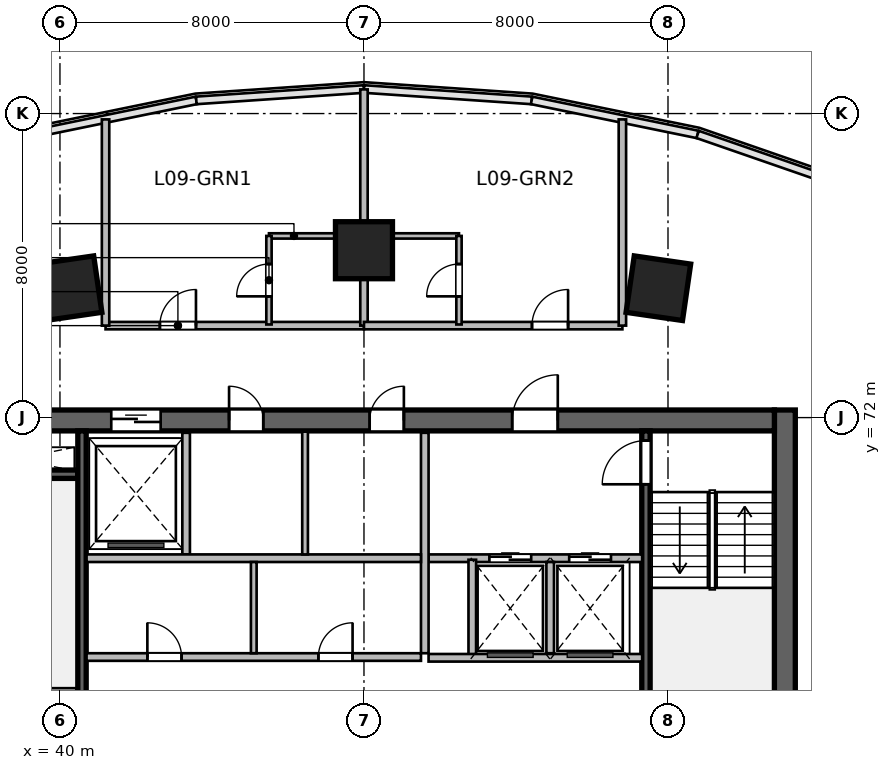
"""IFC4 building model, lengths in metres.
Left out: names, types, materials, properties, quantities, classifications, styles, units other than length and angle.
Written with IfcOpenShell. Run it as: python <this file> out.ifc"""

import sys

from ifc_helpers import new_model, si_unit, direction, frame, frame_2d, origin, origin_2d, place, context, subcontext, project, spatial, rectangle, extrude, source, transform, mapped, element, fill, save


model = new_model("IFC4")
c1 = context("Model", 3, precision=1e-05, world=origin(), true_north=direction((0.0, 1.0)))
c2 = subcontext(c1, "Body", "Model", "MODEL_VIEW")
j1 = project(units=[si_unit("LENGTHUNIT", "METRE"), si_unit("PLANEANGLEUNIT", "RADIAN")], contexts=[c1])
p1 = place(None, origin())
s1 = spatial("IfcSite", under=j1, at=p1, CompositionType="ELEMENT")
p2 = place(p1, origin())
s2 = spatial("IfcBuilding", under=s1, at=p2, CompositionType="ELEMENT")
p3 = place(p2, frame((0.0, 0.0, 46.2)))
s3 = spatial("IfcBuildingStorey", under=s2, at=p3, CompositionType="ELEMENT", Elevation=46.2)
m1 = source(origin(), c2, "Body", "SweptSolid", [
    extrude(rectangle(XDim=12.0, YDim=0.55, at=frame_2d((6.0, 0.0))), origin(), (0.0, 0.0, 1.0), 3.6),
])
p4 = place(p3, frame((59.075, 60.2, 0.0), z_axis=(0.0, 0.0, 1.0), x_axis=(0.0, 1.0, 0.0)))
e1 = element("IfcWall", 1, at=p4, inside=s3, PredefinedType="SHEAR", context=c2, shape_type="MappedRepresentation", body=[
    mapped(m1, transform((0.0, 0.0, 0.0), scale=1.0)),
])
m2 = source(origin(), c2, "Body", "SweptSolid", [
    extrude(rectangle(XDim=21.6, YDim=0.55, at=frame_2d((10.8, 0.0))), origin(), (0.0, 0.0, 1.0), 3.6),
])
p5 = place(p3, frame((37.2, 71.925, 0.0), z_axis=(0.0, 0.0, 1.0), x_axis=(1.0, 0.0, 0.0)))
e2 = element("IfcWall", 2, at=p5, inside=s3, PredefinedType="SHEAR", context=c2, shape_type="MappedRepresentation", body=[
    mapped(m2, transform((0.0, 0.0, 0.0), scale=1.0)),
])
p6 = place(p5, frame((1.2, 0.0, 0.0)))
e3 = element("IfcOpeningElement", 3, at=p6, cuts=e2, PredefinedType="OPENING", context=c2, shape_type="SweptSolid", body=[
    extrude(rectangle(XDim=0.9, YDim=2.1, at=frame_2d((0.45, 1.05))), frame((0.0, 0.285, 0.0), z_axis=(0.0, -1.0, 0.0), x_axis=(1.0, 0.0, 0.0)), (0.0, 0.0, 1.0), 0.57),
])
p7 = place(p5, frame((14.7, 0.0, 0.0)))
e4 = element("IfcOpeningElement", 4, at=p7, cuts=e2, PredefinedType="OPENING", context=c2, shape_type="SweptSolid", body=[
    extrude(rectangle(XDim=1.2, YDim=2.15, at=frame_2d((0.6, 1.075))), frame((0.0, 0.285, 0.0), z_axis=(0.0, -1.0, 0.0), x_axis=(1.0, 0.0, 0.0)), (0.0, 0.0, 1.0), 0.57),
])
p8 = place(p5, frame((4.15, 0.0, 0.0)))
e5 = element("IfcOpeningElement", 5, at=p8, cuts=e2, PredefinedType="OPENING", context=c2, shape_type="SweptSolid", body=[
    extrude(rectangle(XDim=1.3, YDim=2.15, at=frame_2d((0.65, 1.075))), frame((0.0, 0.285, 0.0), z_axis=(0.0, -1.0, 0.0), x_axis=(1.0, 0.0, 0.0)), (0.0, 0.0, 1.0), 0.57),
])
p9 = place(p5, frame((7.25, 0.0, 0.0)))
e6 = element("IfcOpeningElement", 6, at=p9, cuts=e2, PredefinedType="OPENING", context=c2, shape_type="SweptSolid", body=[
    extrude(rectangle(XDim=0.9, YDim=2.1, at=frame_2d((0.45, 1.05))), frame((0.0, 0.285, 0.0), z_axis=(0.0, -1.0, 0.0), x_axis=(1.0, 0.0, 0.0)), (0.0, 0.0, 1.0), 0.57),
])
p10 = place(p5, frame((10.95, 0.0, 0.0)))
e7 = element("IfcOpeningElement", 7, at=p10, cuts=e2, PredefinedType="OPENING", context=c2, shape_type="SweptSolid", body=[
    extrude(rectangle(XDim=0.9, YDim=2.1, at=frame_2d((0.45, 1.05))), frame((0.0, 0.285, 0.0), z_axis=(0.0, -1.0, 0.0), x_axis=(1.0, 0.0, 0.0)), (0.0, 0.0, 1.0), 0.57),
])
m3 = source(origin(), c2, "Body", "SweptSolid", [
    extrude(rectangle(XDim=3.27, YDim=0.22, at=frame_2d((1.635, 0.0))), origin(), (0.0, 0.0, 1.0), 3.6),
])
p11 = place(p3, frame((37.2, 70.51, 0.0), z_axis=(0.0, 0.0, 1.0), x_axis=(1.0, 0.0, 0.0)))
e8 = element("IfcWall", 8, at=p11, inside=s3, PredefinedType="SHEAR", context=c2, shape_type="MappedRepresentation", body=[
    mapped(m3, transform((0.0, 0.0, 0.0), scale=1.0)),
])
m4 = source(origin(), c2, "Body", "SweptSolid", [
    extrude(rectangle(XDim=10.9, YDim=0.22, at=frame_2d((5.45, 0.0))), origin(), (0.0, 0.0, 1.0), 3.6),
])
p12 = place(p3, frame((40.58, 60.75, 0.0), z_axis=(0.0, 0.0, 1.0), x_axis=(0.0, 1.0, 0.0)))
e9 = element("IfcWall", 9, at=p12, inside=s3, PredefinedType="SHEAR", context=c2, shape_type="MappedRepresentation", body=[
    mapped(m4, transform((0.0, 0.0, 0.0), scale=1.0)),
])
p13 = place(p3, frame((55.42, 60.75, 0.0), z_axis=(0.0, 0.0, 1.0), x_axis=(0.0, 1.0, 0.0)))
e10 = element("IfcWall", 10, at=p13, inside=s3, PredefinedType="SHEAR", context=c2, shape_type="MappedRepresentation", body=[
    mapped(m4, transform((0.0, 0.0, 0.0), scale=1.0)),
])
p14 = place(p13, frame((9.495, 0.0, 0.0)))
e11 = element("IfcOpeningElement", 11, at=p14, cuts=e10, PredefinedType="OPENING", context=c2, shape_type="SweptSolid", body=[
    extrude(rectangle(XDim=1.15, YDim=2.15, at=frame_2d((0.575, 1.075))), frame((0.0, 0.12, 0.0), z_axis=(0.0, -1.0, 0.0), x_axis=(1.0, 0.0, 0.0)), (0.0, 0.0, 1.0), 0.24),
])
m5 = source(origin(), c2, "Body", "SweptSolid", [
    extrude(rectangle(XDim=1.5, YDim=1.5, at=origin_2d()), origin(), (0.0, 0.0, 1.0), 3.6),
])
for number, where, z_axis, x_axis in (
    (12, (40.253, 75.404, 0.0), (0.0, 0.0, 1.0), (-0.143, 0.99, 0.0)),
    (13, (48.0, 76.404, 0.0), (0.0, 0.0, 1.0), (0.0, 1.0, 0.0)),
    (14, (55.747, 75.404, 0.0), (0.0, 0.0, 1.0), (0.143, 0.99, 0.0)),
):
    element("IfcColumn", number, at=place(p3, frame(where, z_axis=z_axis, x_axis=x_axis)), inside=s3, PredefinedType="COLUMN", context=c2, shape_type="MappedRepresentation", body=[
        mapped(m5, transform((0.0, 0.0, 0.0), scale=1.0)),
    ])
m6 = source(origin(), c2, "Body", "SweptSolid", [
    extrude(rectangle(XDim=5.62, YDim=0.2, at=frame_2d((2.81, 0.0))), origin(), (0.0, 0.0, 1.0), 3.36),
])
p15 = place(p3, frame((49.7, 68.3, 0.0), z_axis=(0.0, 0.0, 1.0), x_axis=(1.0, 0.0, 0.0)))
e15 = element("IfcWall", 15, at=p15, inside=s3, PredefinedType="SOLIDWALL", context=c2, shape_type="MappedRepresentation", body=[
    mapped(m6, transform((0.0, 0.0, 0.0), scale=1.0)),
])
p16 = place(p15, frame((1.6, 0.0, 0.0)))
e16 = element("IfcOpeningElement", 16, at=p16, cuts=e15, PredefinedType="OPENING", context=c2, shape_type="SweptSolid", body=[
    extrude(rectangle(XDim=1.1, YDim=2.15, at=frame_2d((0.55, 1.075))), frame((0.0, 0.11, 0.0), z_axis=(0.0, -1.0, 0.0), x_axis=(1.0, 0.0, 0.0)), (0.0, 0.0, 1.0), 0.22),
])
p17 = place(p15, frame((3.7, 0.0, 0.0)))
e17 = element("IfcOpeningElement", 17, at=p17, cuts=e15, PredefinedType="OPENING", context=c2, shape_type="SweptSolid", body=[
    extrude(rectangle(XDim=1.1, YDim=2.15, at=frame_2d((0.55, 1.075))), frame((0.0, 0.11, 0.0), z_axis=(0.0, -1.0, 0.0), x_axis=(1.0, 0.0, 0.0)), (0.0, 0.0, 1.0), 0.22),
])
m7 = source(origin(), c2, "Body", "SweptSolid", [
    extrude(rectangle(XDim=5.8, YDim=0.2, at=frame_2d((2.9, 0.0))), origin(), (0.0, 0.0, 1.0), 3.36),
])
p18 = place(p3, frame((49.6, 65.8, 0.0), z_axis=(0.0, 0.0, 1.0), x_axis=(0.0, 1.0, 0.0)))
e18 = element("IfcWall", 18, at=p18, inside=s3, PredefinedType="SOLIDWALL", context=c2, shape_type="MappedRepresentation", body=[
    mapped(m7, transform((0.0, 0.0, 0.0), scale=1.0)),
])
m8 = source(origin(), c2, "Body", "SweptSolid", [
    extrude(rectangle(XDim=2.58, YDim=0.2, at=frame_2d((1.29, 0.0))), origin(), (0.0, 0.0, 1.0), 3.36),
])
p19 = place(p3, frame((50.85, 65.68, 0.0), z_axis=(0.0, 0.0, 1.0), x_axis=(0.0, 1.0, 0.0)))
e19 = element("IfcWall", 19, at=p19, inside=s3, PredefinedType="SOLIDWALL", context=c2, shape_type="MappedRepresentation", body=[
    mapped(m8, transform((0.0, 0.0, 0.0), scale=1.0)),
])
m9 = source(origin(), c2, "Body", "SweptSolid", [
    extrude(rectangle(XDim=2.4, YDim=0.2, at=frame_2d((1.2, 0.0))), origin(), (0.0, 0.0, 1.0), 3.36),
])
p20 = place(p3, frame((52.9, 65.8, 0.0), z_axis=(0.0, 0.0, 1.0), x_axis=(0.0, 1.0, 0.0)))
e20 = element("IfcWall", 20, at=p20, inside=s3, PredefinedType="SOLIDWALL", context=c2, shape_type="MappedRepresentation", body=[
    mapped(m9, transform((0.0, 0.0, 0.0), scale=1.0)),
])
p21 = place(p3, frame((49.7, 65.68, 0.0), z_axis=(0.0, 0.0, 1.0), x_axis=(1.0, 0.0, 0.0)))
e21 = element("IfcWall", 21, at=p21, inside=s3, PredefinedType="SOLIDWALL", context=c2, shape_type="MappedRepresentation", body=[
    mapped(m6, transform((0.0, 0.0, 0.0), scale=1.0)),
])
m10 = source(origin(), c2, "Body", "SweptSolid", [
    extrude(rectangle(XDim=3.2, YDim=0.2, at=frame_2d((1.6, 0.0))), origin(), (0.0, 0.0, 1.0), 3.36),
])
p22 = place(p3, frame((43.32, 68.4, 0.0), z_axis=(0.0, 0.0, 1.0), x_axis=(0.0, 1.0, 0.0)))
e22 = element("IfcWall", 22, at=p22, inside=s3, PredefinedType="SOLIDWALL", context=c2, shape_type="MappedRepresentation", body=[
    mapped(m10, transform((0.0, 0.0, 0.0), scale=1.0)),
])
m11 = source(origin(), c2, "Body", "SweptSolid", [
    extrude(rectangle(XDim=8.8, YDim=0.2, at=frame_2d((4.4, 0.0))), origin(), (0.0, 0.0, 1.0), 3.36),
])
p23 = place(p3, frame((40.7, 68.3, 0.0), z_axis=(0.0, 0.0, 1.0), x_axis=(1.0, 0.0, 0.0)))
e23 = element("IfcWall", 23, at=p23, inside=s3, PredefinedType="SOLIDWALL", context=c2, shape_type="MappedRepresentation", body=[
    mapped(m11, transform((0.0, 0.0, 0.0), scale=1.0)),
])
m12 = source(origin(), c2, "Body", "SweptSolid", [
    extrude(rectangle(XDim=3.23, YDim=0.15, at=frame_2d((1.615, 0.0))), origin(), (0.0, 0.0, 1.0), 3.36),
])
p24 = place(p3, frame((46.45, 68.4, 0.0), z_axis=(0.0, 0.0, 1.0), x_axis=(0.0, 1.0, 0.0)))
e24 = element("IfcWall", 24, at=p24, inside=s3, PredefinedType="PARTITIONING", context=c2, shape_type="MappedRepresentation", body=[
    mapped(m12, transform((0.0, 0.0, 0.0), scale=1.0)),
])
p25 = place(p3, frame((40.7, 65.7, 0.0), z_axis=(0.0, 0.0, 1.0), x_axis=(1.0, 0.0, 0.0)))
e25 = element("IfcWall", 25, at=p25, inside=s3, PredefinedType="SOLIDWALL", context=c2, shape_type="MappedRepresentation", body=[
    mapped(m11, transform((0.0, 0.0, 0.0), scale=1.0)),
])
p26 = place(p25, frame((1.6, 0.0, 0.0)))
e26 = element("IfcOpeningElement", 26, at=p26, cuts=e25, PredefinedType="OPENING", context=c2, shape_type="SweptSolid", body=[
    extrude(rectangle(XDim=0.9, YDim=2.1, at=frame_2d((0.45, 1.05))), frame((0.0, 0.11, 0.0), z_axis=(0.0, -1.0, 0.0), x_axis=(1.0, 0.0, 0.0)), (0.0, 0.0, 1.0), 0.22),
])
p27 = place(p25, frame((6.1, 0.0, 0.0)))
e27 = element("IfcOpeningElement", 27, at=p27, cuts=e25, PredefinedType="OPENING", context=c2, shape_type="SweptSolid", body=[
    extrude(rectangle(XDim=0.9, YDim=2.1, at=frame_2d((0.45, 1.05))), frame((0.0, 0.11, 0.0), z_axis=(0.0, -1.0, 0.0), x_axis=(1.0, 0.0, 0.0)), (0.0, 0.0, 1.0), 0.22),
])
m13 = source(origin(), c2, "Body", "SweptSolid", [
    extrude(rectangle(XDim=2.4, YDim=0.15, at=frame_2d((1.2, 0.0))), origin(), (0.0, 0.0, 1.0), 3.36),
])
p28 = place(p3, frame((45.1, 65.8, 0.0), z_axis=(0.0, 0.0, 1.0), x_axis=(0.0, 1.0, 0.0)))
e28 = element("IfcWall", 28, at=p28, inside=s3, PredefinedType="PARTITIONING", context=c2, shape_type="MappedRepresentation", body=[
    mapped(m13, transform((0.0, 0.0, 0.0), scale=1.0)),
])
m14 = source(origin(), c2, "Body", "SweptSolid", [
    extrude(rectangle(XDim=6.8, YDim=0.195, at=frame_2d((3.4, 0.0))), origin(), (0.0, 0.0, 1.0), 3.36),
])
p29 = place(p3, frame((41.2, 74.42, 0.0), z_axis=(0.0, 0.0, 1.0), x_axis=(1.0, 0.0, 0.0)))
e29 = element("IfcWall", 29, at=p29, inside=s3, PredefinedType="PARTITIONING", context=c2, shape_type="MappedRepresentation", body=[
    mapped(m14, transform((0.0, 0.0, 0.0), scale=1.0)),
])
p30 = place(p29, frame((1.429, 0.0, 0.0)))
e30 = element("IfcOpeningElement", 30, at=p30, cuts=e29, PredefinedType="OPENING", context=c2, shape_type="SweptSolid", body=[
    extrude(rectangle(XDim=0.95, YDim=2.15, at=frame_2d((0.475, 1.075))), frame((0.0, 0.107, 0.0), z_axis=(0.0, -1.0, 0.0), x_axis=(1.0, 0.0, 0.0)), (0.0, 0.0, 1.0), 0.215),
])
m15 = source(origin(), c2, "Body", "SweptSolid", [
    extrude(rectangle(XDim=6.216, YDim=0.195, at=frame_2d((3.108, 0.0))), origin(), (0.0, 0.0, 1.0), 2.644),
])
p31 = place(p3, frame((48.0, 74.42, 0.0), z_axis=(0.0, 0.0, 1.0), x_axis=(0.0, 1.0, 0.0)))
e31 = element("IfcWall", 31, at=p31, inside=s3, PredefinedType="PARTITIONING", context=c2, shape_type="MappedRepresentation", body=[
    mapped(m15, transform((0.0, 0.0, 0.0), scale=1.0)),
])
m16 = source(origin(), c2, "Body", "SweptSolid", [
    extrude(rectangle(XDim=5.426, YDim=0.195, at=frame_2d((2.713, 0.0))), origin(), (0.0, 0.0, 1.0), 3.36),
])
p32 = place(p3, frame((41.2, 74.42, 0.0), z_axis=(0.0, 0.0, 1.0), x_axis=(0.0, 1.0, 0.0)))
e32 = element("IfcWall", 32, at=p32, inside=s3, PredefinedType="PARTITIONING", context=c2, shape_type="MappedRepresentation", body=[
    mapped(m16, transform((0.0, 0.0, 0.0), scale=1.0)),
])
m17 = source(origin(), c2, "Body", "SweptSolid", [
    extrude(rectangle(XDim=2.35, YDim=0.14, at=frame_2d((1.175, 0.0))), origin(), (0.0, 0.0, 1.0), 3.36),
])
p33 = place(p3, frame((45.5, 76.78, 0.0), z_axis=(0.0, 0.0, 1.0), x_axis=(1.0, 0.0, 0.0)))
e33 = element("IfcWall", 33, at=p33, inside=s3, PredefinedType="PARTITIONING", context=c2, shape_type="MappedRepresentation", body=[
    mapped(m17, transform((0.0, 0.0, 0.0), scale=1.0)),
])
m18 = source(origin(), c2, "Body", "SweptSolid", [
    extrude(rectangle(XDim=2.33, YDim=0.14, at=frame_2d((1.165, 0.0))), origin(), (0.0, 0.0, 1.0), 3.36),
])
p34 = place(p3, frame((45.5, 74.45, 0.0), z_axis=(0.0, 0.0, 1.0), x_axis=(0.0, 1.0, 0.0)))
e34 = element("IfcWall", 34, at=p34, inside=s3, PredefinedType="PARTITIONING", context=c2, shape_type="MappedRepresentation", body=[
    mapped(m18, transform((0.0, 0.0, 0.0), scale=1.0)),
])
p35 = place(p34, frame((0.74, 0.0, 0.0)))
e35 = element("IfcOpeningElement", 35, at=p35, cuts=e34, PredefinedType="OPENING", context=c2, shape_type="SweptSolid", body=[
    extrude(rectangle(XDim=0.85, YDim=2.05, at=frame_2d((0.425, 1.025))), frame((0.0, 0.08, 0.0), z_axis=(0.0, -1.0, 0.0), x_axis=(1.0, 0.0, 0.0)), (0.0, 0.0, 1.0), 0.16),
])
p36 = place(p3, frame((48.0, 74.42, 0.0), z_axis=(0.0, 0.0, 1.0), x_axis=(1.0, 0.0, 0.0)))
e36 = element("IfcWall", 36, at=p36, inside=s3, PredefinedType="PARTITIONING", context=c2, shape_type="MappedRepresentation", body=[
    mapped(m14, transform((0.0, 0.0, 0.0), scale=1.0)),
])
p37 = place(p36, frame((4.421, 0.0, 0.0)))
e37 = element("IfcOpeningElement", 37, at=p37, cuts=e36, PredefinedType="OPENING", context=c2, shape_type="SweptSolid", body=[
    extrude(rectangle(XDim=0.95, YDim=2.15, at=frame_2d((0.475, 1.075))), frame((0.0, 0.107, 0.0), z_axis=(0.0, -1.0, 0.0), x_axis=(1.0, 0.0, 0.0)), (0.0, 0.0, 1.0), 0.215),
])
p38 = place(p3, frame((54.8, 74.42, 0.0), z_axis=(0.0, 0.0, 1.0), x_axis=(0.0, 1.0, 0.0)))
e38 = element("IfcWall", 38, at=p38, inside=s3, PredefinedType="PARTITIONING", context=c2, shape_type="MappedRepresentation", body=[
    mapped(m16, transform((0.0, 0.0, 0.0), scale=1.0)),
])
p39 = place(p3, frame((48.15, 76.78, 0.0), z_axis=(0.0, 0.0, 1.0), x_axis=(1.0, 0.0, 0.0)))
e39 = element("IfcWall", 39, at=p39, inside=s3, PredefinedType="PARTITIONING", context=c2, shape_type="MappedRepresentation", body=[
    mapped(m17, transform((0.0, 0.0, 0.0), scale=1.0)),
])
p40 = place(p3, frame((50.5, 74.45, 0.0), z_axis=(0.0, 0.0, 1.0), x_axis=(0.0, 1.0, 0.0)))
e40 = element("IfcWall", 40, at=p40, inside=s3, PredefinedType="PARTITIONING", context=c2, shape_type="MappedRepresentation", body=[
    mapped(m18, transform((0.0, 0.0, 0.0), scale=1.0)),
])
p41 = place(p40, frame((0.74, 0.0, 0.0)))
e41 = element("IfcOpeningElement", 41, at=p41, cuts=e40, PredefinedType="OPENING", context=c2, shape_type="SweptSolid", body=[
    extrude(rectangle(XDim=0.85, YDim=2.05, at=frame_2d((0.425, 1.025))), frame((0.0, 0.08, 0.0), z_axis=(0.0, -1.0, 0.0), x_axis=(1.0, 0.0, 0.0)), (0.0, 0.0, 1.0), 0.16),
])
m19 = source(origin(), c2, "Body", "SweptSolid", [
    extrude(rectangle(XDim=1.15, YDim=2.15, at=frame_2d((0.575, 1.075))), frame((0.0, 0.025, 0.0), z_axis=(0.0, -1.0, 0.0), x_axis=(1.0, 0.0, 0.0)), (0.0, 0.0, 1.0), 0.05),
])
p42 = place(p14, origin())
e42 = element("IfcDoor", 42, at=p42, inside=s3, OperationType="SINGLE_SWING_LEFT", PredefinedType="DOOR", context=c2, shape_type="MappedRepresentation", body=[
    mapped(m19, transform((0.0, 0.0, 0.0), scale=1.0)),
])
fill(e11, e42)
m20 = source(origin(), c2, "Body", "SweptSolid", [
    extrude(rectangle(XDim=1.2, YDim=2.15, at=frame_2d((0.6, 1.075))), frame((0.0, 0.025, 0.0), z_axis=(0.0, -1.0, 0.0), x_axis=(1.0, 0.0, 0.0)), (0.0, 0.0, 1.0), 0.05),
])
p43 = place(p7, origin())
e43 = element("IfcDoor", 43, at=p43, inside=s3, OperationType="SINGLE_SWING_RIGHT", PredefinedType="DOOR", context=c2, shape_type="MappedRepresentation", body=[
    mapped(m20, transform((0.0, 0.0, 0.0), scale=1.0)),
])
fill(e4, e43)
m21 = source(origin(), c2, "Body", "SweptSolid", [
    extrude(rectangle(XDim=1.1, YDim=2.15, at=frame_2d((0.55, 1.075))), frame((0.0, 0.025, 0.0), z_axis=(0.0, -1.0, 0.0), x_axis=(1.0, 0.0, 0.0)), (0.0, 0.0, 1.0), 0.05),
])
p44 = place(p16, origin())
e44 = element("IfcDoor", 44, at=p44, inside=s3, OperationType="DOUBLE_DOOR_SLIDING", PredefinedType="DOOR", context=c2, shape_type="MappedRepresentation", body=[
    mapped(m21, transform((0.0, 0.0, 0.0), scale=1.0)),
])
fill(e16, e44)
p45 = place(p17, origin())
e45 = element("IfcDoor", 45, at=p45, inside=s3, OperationType="DOUBLE_DOOR_SLIDING", PredefinedType="DOOR", context=c2, shape_type="MappedRepresentation", body=[
    mapped(m21, transform((0.0, 0.0, 0.0), scale=1.0)),
])
fill(e17, e45)
m22 = source(origin(), c2, "Body", "SweptSolid", [
    extrude(rectangle(XDim=1.3, YDim=2.15, at=frame_2d((0.65, 1.075))), frame((0.0, 0.025, 0.0), z_axis=(0.0, -1.0, 0.0), x_axis=(1.0, 0.0, 0.0)), (0.0, 0.0, 1.0), 0.05),
])
p46 = place(p8, origin())
e46 = element("IfcDoor", 46, at=p46, inside=s3, OperationType="DOUBLE_DOOR_SLIDING", PredefinedType="DOOR", context=c2, shape_type="MappedRepresentation", body=[
    mapped(m22, transform((0.0, 0.0, 0.0), scale=1.0)),
])
fill(e5, e46)
m23 = source(origin(), c2, "Body", "SweptSolid", [
    extrude(rectangle(XDim=0.9, YDim=2.1, at=frame_2d((0.45, 1.05))), frame((0.0, 0.025, 0.0), z_axis=(0.0, -1.0, 0.0), x_axis=(1.0, 0.0, 0.0)), (0.0, 0.0, 1.0), 0.05),
])
p47 = place(p9, origin())
e47 = element("IfcDoor", 47, at=p47, inside=s3, OperationType="SINGLE_SWING_LEFT", PredefinedType="DOOR", context=c2, shape_type="MappedRepresentation", body=[
    mapped(m23, transform((0.0, 0.0, 0.0), scale=1.0)),
])
fill(e6, e47)
p48 = place(p10, origin())
e48 = element("IfcDoor", 48, at=p48, inside=s3, OperationType="SINGLE_SWING_RIGHT", PredefinedType="DOOR", context=c2, shape_type="MappedRepresentation", body=[
    mapped(m23, transform((0.0, 0.0, 0.0), scale=1.0)),
])
fill(e7, e48)
p49 = place(p26, origin())
e49 = element("IfcDoor", 49, at=p49, inside=s3, OperationType="SINGLE_SWING_LEFT", PredefinedType="DOOR", context=c2, shape_type="MappedRepresentation", body=[
    mapped(m23, transform((0.0, 0.0, 0.0), scale=1.0)),
])
fill(e26, e49)
p50 = place(p27, origin())
e50 = element("IfcDoor", 50, at=p50, inside=s3, OperationType="SINGLE_SWING_RIGHT", PredefinedType="DOOR", context=c2, shape_type="MappedRepresentation", body=[
    mapped(m23, transform((0.0, 0.0, 0.0), scale=1.0)),
])
fill(e27, e50)
m24 = source(origin(), c2, "Body", "SweptSolid", [
    extrude(rectangle(XDim=0.95, YDim=2.15, at=frame_2d((0.475, 1.075))), frame((0.0, 0.025, 0.0), z_axis=(0.0, -1.0, 0.0), x_axis=(1.0, 0.0, 0.0)), (0.0, 0.0, 1.0), 0.05),
])
p51 = place(p30, origin())
e51 = element("IfcDoor", 51, at=p51, inside=s3, OperationType="SINGLE_SWING_RIGHT", PredefinedType="DOOR", context=c2, shape_type="MappedRepresentation", body=[
    mapped(m24, transform((0.0, 0.0, 0.0), scale=1.0)),
])
fill(e30, e51)
m25 = source(origin(), c2, "Body", "SweptSolid", [
    extrude(rectangle(XDim=0.85, YDim=2.05, at=frame_2d((0.425, 1.025))), frame((0.0, 0.025, 0.0), z_axis=(0.0, -1.0, 0.0), x_axis=(1.0, 0.0, 0.0)), (0.0, 0.0, 1.0), 0.05),
])
p52 = place(p35, origin())
e52 = element("IfcDoor", 52, at=p52, inside=s3, OperationType="SINGLE_SWING_LEFT", PredefinedType="DOOR", context=c2, shape_type="MappedRepresentation", body=[
    mapped(m25, transform((0.0, 0.0, 0.0), scale=1.0)),
])
fill(e35, e52)
p53 = place(p37, origin())
e53 = element("IfcDoor", 53, at=p53, inside=s3, OperationType="SINGLE_SWING_RIGHT", PredefinedType="DOOR", context=c2, shape_type="MappedRepresentation", body=[
    mapped(m24, transform((0.0, 0.0, 0.0), scale=1.0)),
])
fill(e37, e53)
p54 = place(p41, origin())
e54 = element("IfcDoor", 54, at=p54, inside=s3, OperationType="SINGLE_SWING_LEFT", PredefinedType="DOOR", context=c2, shape_type="MappedRepresentation", body=[
    mapped(m25, transform((0.0, 0.0, 0.0), scale=1.0)),
])
fill(e41, e54)
save(model, sys.argv[1])
